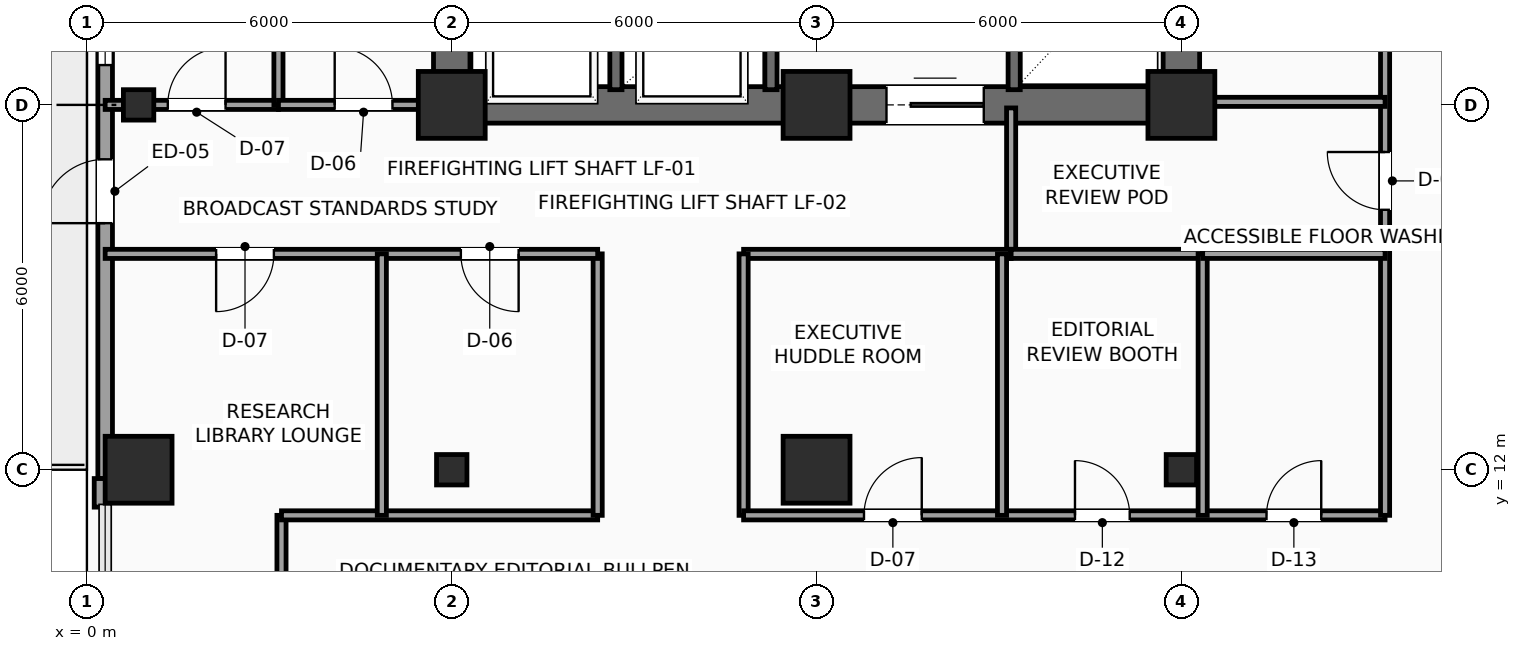
"""IFC4 building model, lengths in metres.
Left out: names, types, materials, properties, quantities, classifications, styles, units other than length and angle.
Written with IfcOpenShell. Run it as: python <this file> out.ifc"""

import sys

from ifc_helpers import new_model, si_unit, direction, frame, frame_2d, origin, origin_2d, place, context, subcontext, project, spatial, rectangle, hollow_rectangle, extrude, element, fill, save


model = new_model("IFC4")
c1 = context("Model", 3, precision=1e-05, world=origin(), true_north=direction((0.0, 1.0)))
c2 = subcontext(c1, "Body", "Model", "MODEL_VIEW")
j1 = project(units=[si_unit("LENGTHUNIT", "METRE"), si_unit("PLANEANGLEUNIT", "RADIAN")], contexts=[c1])
p1 = place(None, origin())
s1 = spatial("IfcSite", under=j1, at=p1, CompositionType="ELEMENT")
p2 = place(p1, origin())
s2 = spatial("IfcBuilding", under=s1, at=p2, CompositionType="ELEMENT")
p3 = place(p2, frame((0.0, 0.0, 156.9)))
s3 = spatial("IfcBuildingStorey", under=s2, at=p3, CompositionType="ELEMENT", Elevation=156.9)
for number, where, z_axis, x_axis in (
    (1, (6.0, 18.0, 0.0), (0.0, 0.0, 1.0), (1.0, 0.0, 0.0)),
    (2, (12.0, 18.0, 0.0), (0.0, 0.0, 1.0), (1.0, 0.0, 0.0)),
    (3, (18.0, 18.0, 0.0), (0.0, 0.0, 1.0), (1.0, 0.0, 0.0)),
    (4, (0.85, 12.0, 0.0), (0.0, 0.0, 1.0), (1.0, 0.0, 0.0)),
):
    element("IfcColumn", number, at=place(p3, frame(where, z_axis=z_axis, x_axis=x_axis)), inside=s3, PredefinedType="COLUMN", context=c2, shape_type="SweptSolid", body=[
        extrude(rectangle(XDim=1.1, YDim=1.1, at=origin_2d()), origin(), (0.0, 0.0, 1.0), 3.75),
    ])
for number, where, z_axis, x_axis in (
    (5, (0.85, 18.0, 0.0), (0.0, 0.0, 1.0), (1.0, 0.0, 0.0)),
    (6, (6.0, 12.0, 0.0), (0.0, 0.0, 1.0), (1.0, 0.0, 0.0)),
):
    element("IfcColumn", number, at=place(p3, frame(where, z_axis=z_axis, x_axis=x_axis)), inside=s3, PredefinedType="COLUMN", context=c2, shape_type="SweptSolid", body=[
        extrude(hollow_rectangle(XDim=0.5, YDim=0.5, WallThickness=0.025, InnerFilletRadius=0.025, OuterFilletRadius=0.04, at=origin_2d()), origin(), (0.0, 0.0, 1.0), 3.75),
    ])
p4 = place(p3, frame((12.0, 12.0, 0.0), z_axis=(0.0, 0.0, 1.0), x_axis=(1.0, 0.0, 0.0)))
e7 = element("IfcColumn", 7, at=p4, inside=s3, PredefinedType="COLUMN", context=c2, shape_type="SweptSolid", body=[
    extrude(rectangle(XDim=1.1, YDim=1.1, at=origin_2d()), origin(), (0.0, 0.0, 1.0), 3.75),
])
p5 = place(p3, frame((18.0, 12.0, 0.0), z_axis=(0.0, 0.0, 1.0), x_axis=(1.0, 0.0, 0.0)))
e8 = element("IfcColumn", 8, at=p5, inside=s3, PredefinedType="COLUMN", context=c2, shape_type="SweptSolid", body=[
    extrude(hollow_rectangle(XDim=0.5, YDim=0.5, WallThickness=0.025, InnerFilletRadius=0.025, OuterFilletRadius=0.04, at=origin_2d()), origin(), (0.0, 0.0, 1.0), 3.75),
])
p6 = place(p3, frame((0.3, 11.855, 0.0), z_axis=(0.0, 0.0, 1.0), x_axis=(0.0, 1.0, 0.0)))
e9 = element("IfcWall", 9, at=p6, inside=s3, PredefinedType="SOLIDWALL", context=c2, shape_type="SweptSolid", body=[
    extrude(rectangle(XDim=9.29, YDim=0.24, at=frame_2d((4.645, 0.0))), origin(), (0.0, 0.0, 1.0), 3.525),
])
p7 = place(p6, frame((4.2, 0.0, 0.0)))
e10 = element("IfcOpeningElement", 10, at=p7, cuts=e9, PredefinedType="OPENING", context=c2, shape_type="SweptSolid", body=[
    extrude(rectangle(XDim=1.05, YDim=2.2, at=frame_2d((0.525, 1.1))), frame((0.0, 0.13, 0.0), z_axis=(0.0, -1.0, 0.0), x_axis=(1.0, 0.0, 0.0)), (0.0, 0.0, 1.0), 0.26),
])
p8 = place(p6, frame((6.8, 0.0, 0.85)))
e11 = element("IfcOpeningElement", 11, at=p8, cuts=e9, PredefinedType="OPENING", context=c2, shape_type="SweptSolid", body=[
    extrude(rectangle(XDim=1.8, YDim=2.1, at=frame_2d((0.9, 1.05))), frame((0.0, 0.13, 0.0), z_axis=(0.0, -1.0, 0.0), x_axis=(1.0, 0.0, 0.0)), (0.0, 0.0, 1.0), 0.26),
])
p9 = place(p3, frame((0.24, 11.385, 0.0), z_axis=(0.0, 0.0, 1.0), x_axis=(0.0, 1.0, 0.0)))
e12 = element("IfcWall", 12, at=p9, inside=s3, PredefinedType="SOLIDWALL", context=c2, shape_type="SweptSolid", body=[
    extrude(rectangle(XDim=0.47, YDim=0.24, at=frame_2d((0.235, 0.0))), origin(), (0.0, 0.0, 1.0), 3.525),
])
p10 = place(p3, frame((6.0, 18.0, 0.0), z_axis=(0.0, 0.0, 1.0), x_axis=(1.0, 0.0, 0.0)))
e13 = element("IfcWall", 13, at=p10, inside=s3, PredefinedType="SHEAR", context=c2, shape_type="SweptSolid", body=[
    extrude(rectangle(XDim=12.0, YDim=0.6, at=frame_2d((6.0, 0.0))), origin(), (0.0, 0.0, 1.0), 3.525),
])
p11 = place(p10, frame((7.15, 0.0, 0.0)))
e14 = element("IfcOpeningElement", 14, at=p11, cuts=e13, PredefinedType="OPENING", context=c2, shape_type="SweptSolid", body=[
    extrude(rectangle(XDim=1.6, YDim=2.3, at=frame_2d((0.8, 1.15))), frame((0.0, 0.31, 0.0), z_axis=(0.0, -1.0, 0.0), x_axis=(1.0, 0.0, 0.0)), (0.0, 0.0, 1.0), 0.62),
])
for number, where, z_axis, x_axis in (
    (15, (6.0, 18.0, 0.0), (0.0, 0.0, 1.0), (0.0, 1.0, 0.0)),
    (16, (18.0, 18.0, 0.0), (0.0, 0.0, 1.0), (0.0, 1.0, 0.0)),
):
    element("IfcWall", number, at=place(p3, frame(where, z_axis=z_axis, x_axis=x_axis)), inside=s3, PredefinedType="SHEAR", context=c2, shape_type="SweptSolid", body=[
        extrude(rectangle(XDim=9.6, YDim=0.6, at=frame_2d((4.8, 0.0))), origin(), (0.0, 0.0, 1.0), 3.525),
    ])
for number, where, z_axis, x_axis in (
    (17, (8.7, 18.25, 0.0), (0.0, 0.0, 1.0), (0.0, 1.0, 0.0)),
    (18, (11.25, 18.25, 0.0), (0.0, 0.0, 1.0), (0.0, 1.0, 0.0)),
):
    element("IfcWall", number, at=place(p3, frame(where, z_axis=z_axis, x_axis=x_axis)), inside=s3, PredefinedType="SHEAR", context=c2, shape_type="SweptSolid", body=[
        extrude(rectangle(XDim=2.17, YDim=0.2, at=frame_2d((1.085, 0.0))), origin(), (0.0, 0.0, 1.0), 3.525),
    ])
p12 = place(p3, frame((15.25, 18.25, 0.0), z_axis=(0.0, 0.0, 1.0), x_axis=(0.0, 1.0, 0.0)))
e19 = element("IfcWall", 19, at=p12, inside=s3, PredefinedType="SHEAR", context=c2, shape_type="SweptSolid", body=[
    extrude(rectangle(XDim=5.2, YDim=0.2, at=frame_2d((2.6, 0.0))), origin(), (0.0, 0.0, 1.0), 3.525),
])
p13 = place(p3, frame((3.2, 9.2, 0.0), z_axis=(0.0, 0.0, 1.0), x_axis=(0.0, 1.0, 0.0)))
e20 = element("IfcWall", 20, at=p13, inside=s3, PredefinedType="PARTITIONING", context=c2, shape_type="SweptSolid", body=[
    extrude(rectangle(XDim=2.05, YDim=0.15, at=frame_2d((1.025, 0.0))), origin(), (0.0, 0.0, 1.0), 3.525),
])
p14 = place(p3, frame((3.2, 11.25, 0.0), z_axis=(0.0, 0.0, 1.0), x_axis=(1.0, 0.0, 0.0)))
e21 = element("IfcWall", 21, at=p14, inside=s3, PredefinedType="PARTITIONING", context=c2, shape_type="SweptSolid", body=[
    extrude(rectangle(XDim=5.2, YDim=0.15, at=frame_2d((2.6, 0.0))), origin(), (0.0, 0.0, 1.0), 3.525),
])
p15 = place(p3, frame((8.4, 11.25, 0.0), z_axis=(0.0, 0.0, 1.0), x_axis=(0.0, 1.0, 0.0)))
e22 = element("IfcWall", 22, at=p15, inside=s3, PredefinedType="PARTITIONING", context=c2, shape_type="SweptSolid", body=[
    extrude(rectangle(XDim=4.3, YDim=0.15, at=frame_2d((2.15, 0.0))), origin(), (0.0, 0.0, 1.0), 3.525),
])
p16 = place(p3, frame((8.4, 15.55, 0.0), z_axis=(0.0, 0.0, 1.0), x_axis=(-1.0, 0.0, 0.0)))
e23 = element("IfcWall", 23, at=p16, inside=s3, PredefinedType="PARTITIONING", context=c2, shape_type="SweptSolid", body=[
    extrude(rectangle(XDim=8.1, YDim=0.15, at=frame_2d((4.05, 0.0))), origin(), (0.0, 0.0, 1.0), 3.525),
])
p17 = place(p16, frame((5.325, 0.0, 0.0)))
e24 = element("IfcOpeningElement", 24, at=p17, cuts=e23, PredefinedType="OPENING", context=c2, shape_type="SweptSolid", body=[
    extrude(rectangle(XDim=0.95, YDim=2.15, at=frame_2d((0.475, 1.075))), frame((0.0, 0.085, 0.0), z_axis=(0.0, -1.0, 0.0), x_axis=(1.0, 0.0, 0.0)), (0.0, 0.0, 1.0), 0.17),
])
p18 = place(p16, frame((1.3, 0.0, 0.0)))
e25 = element("IfcOpeningElement", 25, at=p18, cuts=e23, PredefinedType="OPENING", context=c2, shape_type="SweptSolid", body=[
    extrude(rectangle(XDim=0.95, YDim=2.15, at=frame_2d((0.475, 1.075))), frame((0.0, 0.085, 0.0), z_axis=(0.0, -1.0, 0.0), x_axis=(1.0, 0.0, 0.0)), (0.0, 0.0, 1.0), 0.17),
])
p19 = place(p3, frame((15.2, 17.95, 0.0), z_axis=(0.0, 0.0, 1.0), x_axis=(0.0, -1.0, 0.0)))
e26 = element("IfcWall", 26, at=p19, inside=s3, PredefinedType="PARTITIONING", context=c2, shape_type="SweptSolid", body=[
    extrude(rectangle(XDim=2.4, YDim=0.15, at=frame_2d((1.2, 0.0))), origin(), (0.0, 0.0, 1.0), 3.525),
])
p20 = place(p3, frame((15.2, 15.55, 0.0), z_axis=(0.0, 0.0, 1.0), x_axis=(-1.0, 0.0, 0.0)))
e27 = element("IfcWall", 27, at=p20, inside=s3, PredefinedType="PARTITIONING", context=c2, shape_type="SweptSolid", body=[
    extrude(rectangle(XDim=4.4, YDim=0.15, at=frame_2d((2.2, 0.0))), origin(), (0.0, 0.0, 1.0), 3.525),
])
p21 = place(p3, frame((10.8, 15.55, 0.0), z_axis=(0.0, 0.0, 1.0), x_axis=(0.0, -1.0, 0.0)))
e28 = element("IfcWall", 28, at=p21, inside=s3, PredefinedType="PARTITIONING", context=c2, shape_type="SweptSolid", body=[
    extrude(rectangle(XDim=4.3, YDim=0.15, at=frame_2d((2.15, 0.0))), origin(), (0.0, 0.0, 1.0), 3.525),
])
p22 = place(p3, frame((10.8, 11.25, 0.0), z_axis=(0.0, 0.0, 1.0), x_axis=(1.0, 0.0, 0.0)))
e29 = element("IfcWall", 29, at=p22, inside=s3, PredefinedType="PARTITIONING", context=c2, shape_type="SweptSolid", body=[
    extrude(rectangle(XDim=10.55, YDim=0.15, at=frame_2d((5.275, 0.0))), origin(), (0.0, 0.0, 1.0), 3.525),
])
p23 = place(p22, frame((1.98, 0.0, 0.0)))
e30 = element("IfcOpeningElement", 30, at=p23, cuts=e29, PredefinedType="OPENING", context=c2, shape_type="SweptSolid", body=[
    extrude(rectangle(XDim=0.95, YDim=2.15, at=frame_2d((0.475, 1.075))), frame((0.0, 0.085, 0.0), z_axis=(0.0, -1.0, 0.0), x_axis=(1.0, 0.0, 0.0)), (0.0, 0.0, 1.0), 0.17),
])
p24 = place(p22, frame((5.45, 0.0, 0.0)))
e31 = element("IfcOpeningElement", 31, at=p24, cuts=e29, PredefinedType="OPENING", context=c2, shape_type="SweptSolid", body=[
    extrude(rectangle(XDim=0.9, YDim=2.1, at=frame_2d((0.45, 1.05))), frame((0.0, 0.085, 0.0), z_axis=(0.0, -1.0, 0.0), x_axis=(1.0, 0.0, 0.0)), (0.0, 0.0, 1.0), 0.17),
])
p25 = place(p22, frame((8.6, 0.0, 0.0)))
e32 = element("IfcOpeningElement", 32, at=p25, cuts=e29, PredefinedType="OPENING", context=c2, shape_type="SweptSolid", body=[
    extrude(rectangle(XDim=0.9, YDim=2.1, at=frame_2d((0.45, 1.05))), frame((0.0, 0.085, 0.0), z_axis=(0.0, -1.0, 0.0), x_axis=(1.0, 0.0, 0.0)), (0.0, 0.0, 1.0), 0.17),
])
p26 = place(p3, frame((21.35, 11.25, 0.0), z_axis=(0.0, 0.0, 1.0), x_axis=(0.0, 1.0, 0.0)))
e33 = element("IfcWall", 33, at=p26, inside=s3, PredefinedType="PARTITIONING", context=c2, shape_type="SweptSolid", body=[
    extrude(rectangle(XDim=19.0, YDim=0.15, at=frame_2d((9.5, 0.0))), origin(), (0.0, 0.0, 1.0), 3.525),
])
p27 = place(p26, frame((11.075, 0.0, 0.0)))
e34 = element("IfcOpeningElement", 34, at=p27, cuts=e33, PredefinedType="OPENING", context=c2, shape_type="SweptSolid", body=[
    extrude(rectangle(XDim=0.95, YDim=2.15, at=frame_2d((0.475, 1.075))), frame((0.0, 0.085, 0.0), z_axis=(0.0, -1.0, 0.0), x_axis=(1.0, 0.0, 0.0)), (0.0, 0.0, 1.0), 0.17),
])
p28 = place(p26, frame((5.025, 0.0, 0.0)))
e35 = element("IfcOpeningElement", 35, at=p28, cuts=e33, PredefinedType="OPENING", context=c2, shape_type="SweptSolid", body=[
    extrude(rectangle(XDim=0.95, YDim=2.15, at=frame_2d((0.475, 1.075))), frame((0.0, 0.085, 0.0), z_axis=(0.0, -1.0, 0.0), x_axis=(1.0, 0.0, 0.0)), (0.0, 0.0, 1.0), 0.17),
])
p29 = place(p3, frame((15.05, 11.25, 0.0), z_axis=(0.0, 0.0, 1.0), x_axis=(0.0, 1.0, 0.0)))
e36 = element("IfcWall", 36, at=p29, inside=s3, PredefinedType="PARTITIONING", context=c2, shape_type="SweptSolid", body=[
    extrude(rectangle(XDim=4.3, YDim=0.15, at=frame_2d((2.15, 0.0))), origin(), (0.0, 0.0, 1.0), 3.525),
])
p30 = place(p3, frame((15.2, 15.55, 0.0), z_axis=(0.0, 0.0, 1.0), x_axis=(1.0, 0.0, 0.0)))
e37 = element("IfcWall", 37, at=p30, inside=s3, PredefinedType="PARTITIONING", context=c2, shape_type="SweptSolid", body=[
    extrude(rectangle(XDim=3.15, YDim=0.15, at=frame_2d((1.575, 0.0))), origin(), (0.0, 0.0, 1.0), 3.525),
])
p31 = place(p3, frame((18.35, 11.25, 0.0), z_axis=(0.0, 0.0, 1.0), x_axis=(0.0, 1.0, 0.0)))
e38 = element("IfcWall", 38, at=p31, inside=s3, PredefinedType="PARTITIONING", context=c2, shape_type="SweptSolid", body=[
    extrude(rectangle(XDim=4.3, YDim=0.15, at=frame_2d((2.15, 0.0))), origin(), (0.0, 0.0, 1.0), 3.525),
])
p32 = place(p3, frame((18.35, 15.55, 0.0), z_axis=(0.0, 0.0, 1.0), x_axis=(1.0, 0.0, 0.0)))
e39 = element("IfcWall", 39, at=p32, inside=s3, PredefinedType="PARTITIONING", context=c2, shape_type="SweptSolid", body=[
    extrude(rectangle(XDim=3.0, YDim=0.15, at=frame_2d((1.5, 0.0))), origin(), (0.0, 0.0, 1.0), 3.525),
])
p33 = place(p3, frame((18.1, 18.05, 0.0), z_axis=(0.0, 0.0, 1.0), x_axis=(1.0, 0.0, 0.0)))
e40 = element("IfcWall", 40, at=p33, inside=s3, PredefinedType="PARTITIONING", context=c2, shape_type="SweptSolid", body=[
    extrude(rectangle(XDim=3.25, YDim=0.15, at=frame_2d((1.625, 0.0))), origin(), (0.0, 0.0, 1.0), 3.017),
])
p34 = place(p3, frame((0.3, 18.0, 0.0), z_axis=(0.0, 0.0, 1.0), x_axis=(1.0, 0.0, 0.0)))
e41 = element("IfcWall", 41, at=p34, inside=s3, PredefinedType="PARTITIONING", context=c2, shape_type="SweptSolid", body=[
    extrude(rectangle(XDim=2.85, YDim=0.15, at=frame_2d((1.425, 0.0))), origin(), (0.0, 0.0, 1.0), 3.017),
])
p35 = place(p34, frame((1.03, 0.0, 0.0)))
e42 = element("IfcOpeningElement", 42, at=p35, cuts=e41, PredefinedType="OPENING", context=c2, shape_type="SweptSolid", body=[
    extrude(rectangle(XDim=0.95, YDim=2.15, at=frame_2d((0.475, 1.075))), frame((0.0, 0.085, 0.0), z_axis=(0.0, -1.0, 0.0), x_axis=(1.0, 0.0, 0.0)), (0.0, 0.0, 1.0), 0.17),
])
p36 = place(p3, frame((3.15, 18.0, 0.0), z_axis=(0.0, 0.0, 1.0), x_axis=(0.0, 1.0, 0.0)))
e43 = element("IfcWall", 43, at=p36, inside=s3, PredefinedType="PARTITIONING", context=c2, shape_type="SweptSolid", body=[
    extrude(rectangle(XDim=6.1, YDim=0.15, at=frame_2d((3.05, 0.0))), origin(), (0.0, 0.0, 1.0), 3.525),
])
p37 = place(p3, frame((3.15, 18.0, 0.0), z_axis=(0.0, 0.0, 1.0), x_axis=(1.0, 0.0, 0.0)))
e44 = element("IfcWall", 44, at=p37, inside=s3, PredefinedType="PARTITIONING", context=c2, shape_type="SweptSolid", body=[
    extrude(rectangle(XDim=2.8, YDim=0.15, at=frame_2d((1.4, 0.0))), origin(), (0.0, 0.0, 1.0), 3.017),
])
p38 = place(p37, frame((0.925, 0.0, 0.0)))
e45 = element("IfcOpeningElement", 45, at=p38, cuts=e44, PredefinedType="OPENING", context=c2, shape_type="SweptSolid", body=[
    extrude(rectangle(XDim=0.95, YDim=2.15, at=frame_2d((0.475, 1.075))), frame((0.0, 0.085, 0.0), z_axis=(0.0, -1.0, 0.0), x_axis=(1.0, 0.0, 0.0)), (0.0, 0.0, 1.0), 0.17),
])
p39 = place(p3, frame((4.85, 11.25, 0.0), z_axis=(0.0, 0.0, 1.0), x_axis=(0.0, 1.0, 0.0)))
e46 = element("IfcWall", 46, at=p39, inside=s3, PredefinedType="PARTITIONING", context=c2, shape_type="SweptSolid", body=[
    extrude(rectangle(XDim=4.3, YDim=0.15, at=frame_2d((2.15, 0.0))), origin(), (0.0, 0.0, 1.0), 3.525),
])
p40 = place(p7, origin())
e47 = element("IfcDoor", 47, at=p40, inside=s3, OperationType="SINGLE_SWING_LEFT", PredefinedType="DOOR", context=c2, shape_type="SweptSolid", body=[
    extrude(rectangle(XDim=1.05, YDim=2.2, at=frame_2d((0.525, 1.1))), frame((0.0, 0.025, 0.0), z_axis=(0.0, -1.0, 0.0), x_axis=(1.0, 0.0, 0.0)), (0.0, 0.0, 1.0), 0.05),
])
fill(e10, e47)
p41 = place(p8, origin())
e48 = element("IfcWindow", 48, at=p41, inside=s3, PartitioningType="SINGLE_PANEL", PredefinedType="WINDOW", context=c2, shape_type="SweptSolid", body=[
    extrude(rectangle(XDim=1.8, YDim=2.1, at=frame_2d((0.9, 1.05))), frame((0.0, 0.03, 0.0), z_axis=(0.0, -1.0, 0.0), x_axis=(1.0, 0.0, 0.0)), (0.0, 0.0, 1.0), 0.06),
])
fill(e11, e48)
p42 = place(p11, origin())
e49 = element("IfcDoor", 49, at=p42, inside=s3, OperationType="DOUBLE_DOOR_SLIDING", PredefinedType="DOOR", context=c2, shape_type="SweptSolid", body=[
    extrude(rectangle(XDim=1.6, YDim=2.3, at=frame_2d((0.8, 1.15))), frame((0.0, 0.025, 0.0), z_axis=(0.0, -1.0, 0.0), x_axis=(1.0, 0.0, 0.0)), (0.0, 0.0, 1.0), 0.05),
])
fill(e14, e49)
p43 = place(p17, origin())
e50 = element("IfcDoor", 50, at=p43, inside=s3, OperationType="SINGLE_SWING_RIGHT", PredefinedType="DOOR", context=c2, shape_type="SweptSolid", body=[
    extrude(rectangle(XDim=0.95, YDim=2.15, at=frame_2d((0.475, 1.075))), frame((0.0, 0.025, 0.0), z_axis=(0.0, -1.0, 0.0), x_axis=(1.0, 0.0, 0.0)), (0.0, 0.0, 1.0), 0.05),
])
fill(e24, e50)
p44 = place(p18, origin())
e51 = element("IfcDoor", 51, at=p44, inside=s3, OperationType="SINGLE_SWING_LEFT", PredefinedType="DOOR", context=c2, shape_type="SweptSolid", body=[
    extrude(rectangle(XDim=0.95, YDim=2.15, at=frame_2d((0.475, 1.075))), frame((0.0, 0.025, 0.0), z_axis=(0.0, -1.0, 0.0), x_axis=(1.0, 0.0, 0.0)), (0.0, 0.0, 1.0), 0.05),
])
fill(e25, e51)
p45 = place(p23, origin())
e52 = element("IfcDoor", 52, at=p45, inside=s3, OperationType="SINGLE_SWING_RIGHT", PredefinedType="DOOR", context=c2, shape_type="SweptSolid", body=[
    extrude(rectangle(XDim=0.95, YDim=2.15, at=frame_2d((0.475, 1.075))), frame((0.0, 0.025, 0.0), z_axis=(0.0, -1.0, 0.0), x_axis=(1.0, 0.0, 0.0)), (0.0, 0.0, 1.0), 0.05),
])
fill(e30, e52)
p46 = place(p24, origin())
e53 = element("IfcDoor", 53, at=p46, inside=s3, OperationType="SINGLE_SWING_LEFT", PredefinedType="DOOR", context=c2, shape_type="SweptSolid", body=[
    extrude(rectangle(XDim=0.9, YDim=2.1, at=frame_2d((0.45, 1.05))), frame((0.0, 0.025, 0.0), z_axis=(0.0, -1.0, 0.0), x_axis=(1.0, 0.0, 0.0)), (0.0, 0.0, 1.0), 0.05),
])
fill(e31, e53)
p47 = place(p25, origin())
e54 = element("IfcDoor", 54, at=p47, inside=s3, OperationType="SINGLE_SWING_RIGHT", PredefinedType="DOOR", context=c2, shape_type="SweptSolid", body=[
    extrude(rectangle(XDim=0.9, YDim=2.1, at=frame_2d((0.45, 1.05))), frame((0.0, 0.025, 0.0), z_axis=(0.0, -1.0, 0.0), x_axis=(1.0, 0.0, 0.0)), (0.0, 0.0, 1.0), 0.05),
])
fill(e32, e54)
p48 = place(p28, origin())
e55 = element("IfcDoor", 55, at=p48, inside=s3, OperationType="SINGLE_SWING_RIGHT", PredefinedType="DOOR", context=c2, shape_type="SweptSolid", body=[
    extrude(rectangle(XDim=0.95, YDim=2.15, at=frame_2d((0.475, 1.075))), frame((0.0, 0.025, 0.0), z_axis=(0.0, -1.0, 0.0), x_axis=(1.0, 0.0, 0.0)), (0.0, 0.0, 1.0), 0.05),
])
fill(e35, e55)
p49 = place(p35, origin())
e56 = element("IfcDoor", 56, at=p49, inside=s3, OperationType="SINGLE_SWING_RIGHT", PredefinedType="DOOR", context=c2, shape_type="SweptSolid", body=[
    extrude(rectangle(XDim=0.95, YDim=2.15, at=frame_2d((0.475, 1.075))), frame((0.0, 0.025, 0.0), z_axis=(0.0, -1.0, 0.0), x_axis=(1.0, 0.0, 0.0)), (0.0, 0.0, 1.0), 0.05),
])
fill(e42, e56)
p50 = place(p38, origin())
e57 = element("IfcDoor", 57, at=p50, inside=s3, OperationType="SINGLE_SWING_LEFT", PredefinedType="DOOR", context=c2, shape_type="SweptSolid", body=[
    extrude(rectangle(XDim=0.95, YDim=2.15, at=frame_2d((0.475, 1.075))), frame((0.0, 0.025, 0.0), z_axis=(0.0, -1.0, 0.0), x_axis=(1.0, 0.0, 0.0)), (0.0, 0.0, 1.0), 0.05),
])
fill(e45, e57)
save(model, sys.argv[1])
